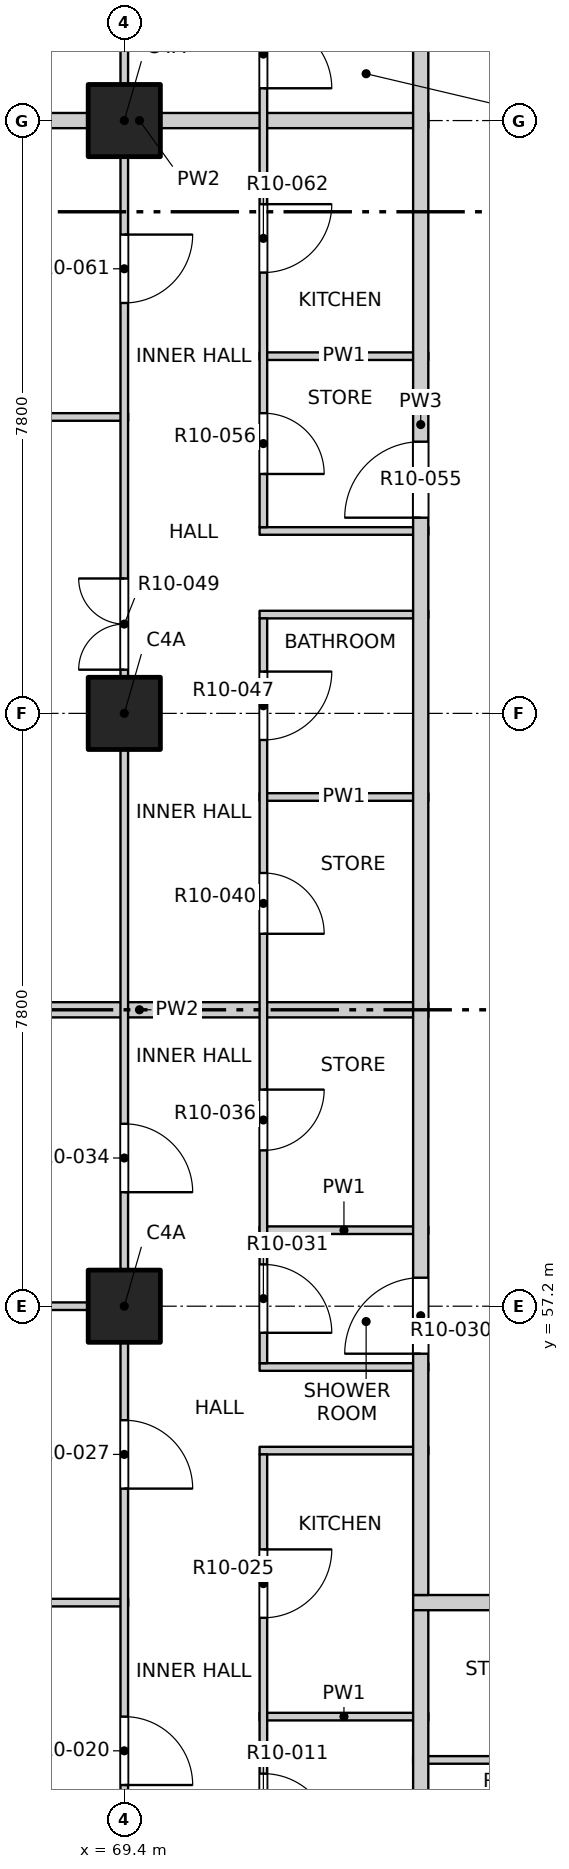
"""IFC4 building model, lengths in metres.
Left out: names, types, materials, properties, quantities, classifications, styles, units other than length and angle.
Written with IfcOpenShell. Run it as: python <this file> out.ifc"""

import sys

from ifc_helpers import new_model, si_unit, direction, frame, frame_2d, origin, origin_2d, place, context, subcontext, project, spatial, rectangle, extrude, element, fill, save


model = new_model("IFC4")
c1 = context("Model", 3, precision=1e-05, world=origin(), true_north=direction((0.0, 1.0)))
c2 = subcontext(c1, "Body", "Model", "MODEL_VIEW")
j1 = project(units=[si_unit("LENGTHUNIT", "METRE"), si_unit("PLANEANGLEUNIT", "RADIAN")], contexts=[c1])
p1 = place(None, origin())
s1 = spatial("IfcSite", under=j1, at=p1, CompositionType="ELEMENT")
p2 = place(p1, origin())
s2 = spatial("IfcBuilding", under=s1, at=p2, CompositionType="ELEMENT")
p3 = place(p2, frame((0.0, 0.0, 123.7)))
s3 = spatial("IfcBuildingStorey", under=s2, at=p3, CompositionType="ELEMENT", Elevation=123.7)
for number, where, z_axis, x_axis in (
    (1, (69.4, 57.2, -0.3), (0.0, 0.0, 1.0), (1.0, 0.0, 0.0)),
    (2, (69.4, 65.0, -0.3), (0.0, 0.0, 1.0), (1.0, 0.0, 0.0)),
    (3, (69.4, 72.8, -0.3), (0.0, 0.0, 1.0), (1.0, 0.0, 0.0)),
):
    element("IfcColumn", number, at=place(p3, frame(where, z_axis=z_axis, x_axis=x_axis)), inside=s3, PredefinedType="COLUMN", context=c2, shape_type="SweptSolid", body=[
        extrude(rectangle(XDim=0.95, YDim=0.95, at=origin_2d()), origin(), (0.0, 0.0, 1.0), 3.45),
    ])
p4 = place(p3, frame((73.2, 51.23, 0.0), z_axis=(0.0, 0.0, 1.0), x_axis=(1.0, 0.0, 0.0)))
e4 = element("IfcWall", 4, at=p4, inside=s3, PredefinedType="PARTITIONING", context=c2, shape_type="SweptSolid", body=[
    extrude(rectangle(XDim=4.95, YDim=0.1, at=frame_2d((2.475, 0.0))), origin(), (0.0, 0.0, 1.0), 3.15),
])
p5 = place(p4, frame((1.2, 0.0, 0.0)))
e5 = element("IfcOpeningElement", 5, at=p5, cuts=e4, PredefinedType="OPENING", context=c2, shape_type="SweptSolid", body=[
    extrude(rectangle(XDim=0.8, YDim=2.1, at=frame_2d((0.4, 1.05))), frame((0.0, 0.06, 0.0), z_axis=(0.0, -1.0, 0.0), x_axis=(1.0, 0.0, 0.0)), (0.0, 0.0, 1.0), 0.12),
])
p6 = place(p4, frame((3.55, 0.0, 0.0)))
e6 = element("IfcOpeningElement", 6, at=p6, cuts=e4, PredefinedType="OPENING", context=c2, shape_type="SweptSolid", body=[
    extrude(rectangle(XDim=0.9, YDim=2.1, at=frame_2d((0.45, 1.05))), frame((0.0, 0.06, 0.0), z_axis=(0.0, -1.0, 0.0), x_axis=(1.0, 0.0, 0.0)), (0.0, 0.0, 1.0), 0.12),
])
p7 = place(p3, frame((71.18, 51.8, 0.0), z_axis=(0.0, 0.0, 1.0), x_axis=(1.0, 0.0, 0.0)))
e7 = element("IfcWall", 7, at=p7, inside=s3, PredefinedType="PARTITIONING", context=c2, shape_type="SweptSolid", body=[
    extrude(rectangle(XDim=2.22, YDim=0.1, at=frame_2d((1.11, 0.0))), origin(), (0.0, 0.0, 1.0), 3.15),
])
p8 = place(p3, frame((65.8, 53.3, 0.0), z_axis=(0.0, 0.0, 1.0), x_axis=(1.0, 0.0, 0.0)))
e8 = element("IfcWall", 8, at=p8, inside=s3, PredefinedType="PARTITIONING", context=c2, shape_type="SweptSolid", body=[
    extrude(rectangle(XDim=3.65, YDim=0.1, at=frame_2d((1.825, 0.0))), origin(), (0.0, 0.0, 1.0), 3.15),
])
p9 = place(p3, frame((73.2, 53.3, 0.0), z_axis=(0.0, 0.0, 1.0), x_axis=(1.0, 0.0, 0.0)))
e9 = element("IfcWall", 9, at=p9, inside=s3, PredefinedType="PARTITIONING", context=c2, shape_type="SweptSolid", body=[
    extrude(rectangle(XDim=23.6, YDim=0.2, at=frame_2d((11.8, 0.0))), origin(), (0.0, 0.0, 1.0), 3.15),
])
p10 = place(p9, frame((6.175, 0.0, 0.0)))
e10 = element("IfcOpeningElement", 10, at=p10, cuts=e9, PredefinedType="OPENING", context=c2, shape_type="SweptSolid", body=[
    extrude(rectangle(XDim=1.0, YDim=2.1, at=frame_2d((0.5, 1.05))), frame((0.0, 0.11, 0.0), z_axis=(0.0, -1.0, 0.0), x_axis=(1.0, 0.0, 0.0)), (0.0, 0.0, 1.0), 0.22),
])
p11 = place(p9, frame((18.775, 0.0, 0.0)))
e11 = element("IfcOpeningElement", 11, at=p11, cuts=e9, PredefinedType="OPENING", context=c2, shape_type="SweptSolid", body=[
    extrude(rectangle(XDim=1.0, YDim=2.1, at=frame_2d((0.5, 1.05))), frame((0.0, 0.11, 0.0), z_axis=(0.0, -1.0, 0.0), x_axis=(1.0, 0.0, 0.0)), (0.0, 0.0, 1.0), 0.22),
])
for number, where, z_axis, x_axis in (
    (12, (71.18, 55.3, 0.0), (0.0, 0.0, 1.0), (1.0, 0.0, 0.0)),
    (13, (71.18, 56.4, 0.0), (0.0, 0.0, 1.0), (1.0, 0.0, 0.0)),
):
    element("IfcWall", number, at=place(p3, frame(where, z_axis=z_axis, x_axis=x_axis)), inside=s3, PredefinedType="PARTITIONING", context=c2, shape_type="SweptSolid", body=[
        extrude(rectangle(XDim=2.22, YDim=0.1, at=frame_2d((1.11, 0.0))), origin(), (0.0, 0.0, 1.0), 3.15),
    ])
p12 = place(p3, frame((65.8, 57.2, 0.0), z_axis=(0.0, 0.0, 1.0), x_axis=(1.0, 0.0, 0.0)))
e14 = element("IfcWall", 14, at=p12, inside=s3, PredefinedType="PARTITIONING", context=c2, shape_type="SweptSolid", body=[
    extrude(rectangle(XDim=3.65, YDim=0.1, at=frame_2d((1.825, 0.0))), origin(), (0.0, 0.0, 1.0), 3.15),
])
p13 = place(p3, frame((71.18, 58.2, 0.0), z_axis=(0.0, 0.0, 1.0), x_axis=(1.0, 0.0, 0.0)))
e15 = element("IfcWall", 15, at=p13, inside=s3, PredefinedType="PARTITIONING", context=c2, shape_type="SweptSolid", body=[
    extrude(rectangle(XDim=2.22, YDim=0.1, at=frame_2d((1.11, 0.0))), origin(), (0.0, 0.0, 1.0), 3.15),
])
p14 = place(p3, frame((65.8, 61.1, 0.0), z_axis=(0.0, 0.0, 1.0), x_axis=(1.0, 0.0, 0.0)))
e16 = element("IfcWall", 16, at=p14, inside=s3, PredefinedType="PARTITIONING", context=c2, shape_type="SweptSolid", body=[
    extrude(rectangle(XDim=7.6, YDim=0.2, at=frame_2d((3.8, 0.0))), origin(), (0.0, 0.0, 1.0), 2.55),
])
for number, where, z_axis, x_axis in (
    (17, (71.18, 63.9, 0.0), (0.0, 0.0, 1.0), (1.0, 0.0, 0.0)),
    (18, (71.18, 66.3, 0.0), (0.0, 0.0, 1.0), (1.0, 0.0, 0.0)),
    (19, (71.18, 67.4, 0.0), (0.0, 0.0, 1.0), (1.0, 0.0, 0.0)),
):
    element("IfcWall", number, at=place(p3, frame(where, z_axis=z_axis, x_axis=x_axis)), inside=s3, PredefinedType="PARTITIONING", context=c2, shape_type="SweptSolid", body=[
        extrude(rectangle(XDim=2.22, YDim=0.1, at=frame_2d((1.11, 0.0))), origin(), (0.0, 0.0, 1.0), 3.15),
    ])
p15 = place(p3, frame((65.8, 68.9, 0.0), z_axis=(0.0, 0.0, 1.0), x_axis=(1.0, 0.0, 0.0)))
e20 = element("IfcWall", 20, at=p15, inside=s3, PredefinedType="PARTITIONING", context=c2, shape_type="SweptSolid", body=[
    extrude(rectangle(XDim=3.65, YDim=0.1, at=frame_2d((1.825, 0.0))), origin(), (0.0, 0.0, 1.0), 2.55),
])
p16 = place(p3, frame((71.18, 69.7, 0.0), z_axis=(0.0, 0.0, 1.0), x_axis=(1.0, 0.0, 0.0)))
e21 = element("IfcWall", 21, at=p16, inside=s3, PredefinedType="PARTITIONING", context=c2, shape_type="SweptSolid", body=[
    extrude(rectangle(XDim=2.22, YDim=0.1, at=frame_2d((1.11, 0.0))), origin(), (0.0, 0.0, 1.0), 3.15),
])
p17 = place(p3, frame((65.8, 72.8, 0.0), z_axis=(0.0, 0.0, 1.0), x_axis=(1.0, 0.0, 0.0)))
e22 = element("IfcWall", 22, at=p17, inside=s3, PredefinedType="PARTITIONING", context=c2, shape_type="SweptSolid", body=[
    extrude(rectangle(XDim=7.6, YDim=0.2, at=frame_2d((3.8, 0.0))), origin(), (0.0, 0.0, 1.0), 3.15),
])
p18 = place(p3, frame((69.4, 45.8, 0.0), z_axis=(0.0, 0.0, 1.0), x_axis=(0.0, 1.0, 0.0)))
e23 = element("IfcWall", 23, at=p18, inside=s3, PredefinedType="PARTITIONING", context=c2, shape_type="SweptSolid", body=[
    extrude(rectangle(XDim=38.4, YDim=0.1, at=frame_2d((19.2, 0.0))), origin(), (0.0, 0.0, 1.0), 3.15),
])
p19 = place(p18, frame((1.05, 0.0, 0.0)))
e24 = element("IfcOpeningElement", 24, at=p19, cuts=e23, PredefinedType="OPENING", context=c2, shape_type="SweptSolid", body=[
    extrude(rectangle(XDim=1.2, YDim=2.1, at=frame_2d((0.6, 1.05))), frame((0.0, 0.06, 0.0), z_axis=(0.0, -1.0, 0.0), x_axis=(1.0, 0.0, 0.0)), (0.0, 0.0, 1.0), 0.12),
])
p20 = place(p18, frame((5.1, 0.0, 0.0)))
e25 = element("IfcOpeningElement", 25, at=p20, cuts=e23, PredefinedType="OPENING", context=c2, shape_type="SweptSolid", body=[
    extrude(rectangle(XDim=0.9, YDim=2.1, at=frame_2d((0.45, 1.05))), frame((0.0, 0.06, 0.0), z_axis=(0.0, -1.0, 0.0), x_axis=(1.0, 0.0, 0.0)), (0.0, 0.0, 1.0), 0.12),
])
p21 = place(p18, frame((9.0, 0.0, 0.0)))
e26 = element("IfcOpeningElement", 26, at=p21, cuts=e23, PredefinedType="OPENING", context=c2, shape_type="SweptSolid", body=[
    extrude(rectangle(XDim=0.9, YDim=2.1, at=frame_2d((0.45, 1.05))), frame((0.0, 0.06, 0.0), z_axis=(0.0, -1.0, 0.0), x_axis=(1.0, 0.0, 0.0)), (0.0, 0.0, 1.0), 0.12),
])
p22 = place(p18, frame((12.9, 0.0, 0.0)))
e27 = element("IfcOpeningElement", 27, at=p22, cuts=e23, PredefinedType="OPENING", context=c2, shape_type="SweptSolid", body=[
    extrude(rectangle(XDim=0.9, YDim=2.1, at=frame_2d((0.45, 1.05))), frame((0.0, 0.06, 0.0), z_axis=(0.0, -1.0, 0.0), x_axis=(1.0, 0.0, 0.0)), (0.0, 0.0, 1.0), 0.12),
])
p23 = place(p18, frame((19.775, 0.0, 0.0)))
e28 = element("IfcOpeningElement", 28, at=p23, cuts=e23, PredefinedType="OPENING", context=c2, shape_type="SweptSolid", body=[
    extrude(rectangle(XDim=1.2, YDim=2.1, at=frame_2d((0.6, 1.05))), frame((0.0, 0.06, 0.0), z_axis=(0.0, -1.0, 0.0), x_axis=(1.0, 0.0, 0.0)), (0.0, 0.0, 1.0), 0.12),
])
p24 = place(p18, frame((24.6, 0.0, 0.0)))
e29 = element("IfcOpeningElement", 29, at=p24, cuts=e23, PredefinedType="OPENING", context=c2, shape_type="SweptSolid", body=[
    extrude(rectangle(XDim=0.9, YDim=2.1, at=frame_2d((0.45, 1.05))), frame((0.0, 0.06, 0.0), z_axis=(0.0, -1.0, 0.0), x_axis=(1.0, 0.0, 0.0)), (0.0, 0.0, 1.0), 0.12),
])
p25 = place(p18, frame((30.3, 0.0, 0.0)))
e30 = element("IfcOpeningElement", 30, at=p25, cuts=e23, PredefinedType="OPENING", context=c2, shape_type="SweptSolid", body=[
    extrude(rectangle(XDim=1.2, YDim=2.1, at=frame_2d((0.6, 1.05))), frame((0.0, 0.06, 0.0), z_axis=(0.0, -1.0, 0.0), x_axis=(1.0, 0.0, 0.0)), (0.0, 0.0, 1.0), 0.12),
])
p26 = place(p18, frame((36.15, 0.0, 0.0)))
e31 = element("IfcOpeningElement", 31, at=p26, cuts=e23, PredefinedType="OPENING", context=c2, shape_type="SweptSolid", body=[
    extrude(rectangle(XDim=1.2, YDim=2.1, at=frame_2d((0.6, 1.05))), frame((0.0, 0.06, 0.0), z_axis=(0.0, -1.0, 0.0), x_axis=(1.0, 0.0, 0.0)), (0.0, 0.0, 1.0), 0.12),
])
p27 = place(p3, frame((71.23, 49.45, 0.0), z_axis=(0.0, 0.0, 1.0), x_axis=(0.0, 1.0, 0.0)))
e32 = element("IfcWall", 32, at=p27, inside=s3, PredefinedType="PARTITIONING", context=c2, shape_type="SweptSolid", body=[
    extrude(rectangle(XDim=5.8, YDim=0.1, at=frame_2d((2.9, 0.0))), origin(), (0.0, 0.0, 1.0), 3.15),
])
p28 = place(p27, frame((0.7, 0.0, 0.0)))
e33 = element("IfcOpeningElement", 33, at=p28, cuts=e32, PredefinedType="OPENING", context=c2, shape_type="SweptSolid", body=[
    extrude(rectangle(XDim=0.9, YDim=2.1, at=frame_2d((0.45, 1.05))), frame((0.0, 0.06, 0.0), z_axis=(0.0, -1.0, 0.0), x_axis=(1.0, 0.0, 0.0)), (0.0, 0.0, 1.0), 0.12),
])
p29 = place(p27, frame((3.65, 0.0, 0.0)))
e34 = element("IfcOpeningElement", 34, at=p29, cuts=e32, PredefinedType="OPENING", context=c2, shape_type="SweptSolid", body=[
    extrude(rectangle(XDim=0.9, YDim=2.1, at=frame_2d((0.45, 1.05))), frame((0.0, 0.06, 0.0), z_axis=(0.0, -1.0, 0.0), x_axis=(1.0, 0.0, 0.0)), (0.0, 0.0, 1.0), 0.12),
])
p30 = place(p3, frame((71.23, 56.45, 0.0), z_axis=(0.0, 0.0, 1.0), x_axis=(0.0, 1.0, 0.0)))
e35 = element("IfcWall", 35, at=p30, inside=s3, PredefinedType="PARTITIONING", context=c2, shape_type="SweptSolid", body=[
    extrude(rectangle(XDim=9.8, YDim=0.1, at=frame_2d((4.9, 0.0))), origin(), (0.0, 0.0, 1.0), 3.15),
])
p31 = place(p30, frame((0.4, 0.0, 0.0)))
e36 = element("IfcOpeningElement", 36, at=p31, cuts=e35, PredefinedType="OPENING", context=c2, shape_type="SweptSolid", body=[
    extrude(rectangle(XDim=0.9, YDim=2.1, at=frame_2d((0.45, 1.05))), frame((0.0, 0.06, 0.0), z_axis=(0.0, -1.0, 0.0), x_axis=(1.0, 0.0, 0.0)), (0.0, 0.0, 1.0), 0.12),
])
p32 = place(p30, frame((2.8, 0.0, 0.0)))
e37 = element("IfcOpeningElement", 37, at=p32, cuts=e35, PredefinedType="OPENING", context=c2, shape_type="SweptSolid", body=[
    extrude(rectangle(XDim=0.8, YDim=2.1, at=frame_2d((0.4, 1.05))), frame((0.0, 0.06, 0.0), z_axis=(0.0, -1.0, 0.0), x_axis=(1.0, 0.0, 0.0)), (0.0, 0.0, 1.0), 0.12),
])
p33 = place(p30, frame((5.65, 0.0, 0.0)))
e38 = element("IfcOpeningElement", 38, at=p33, cuts=e35, PredefinedType="OPENING", context=c2, shape_type="SweptSolid", body=[
    extrude(rectangle(XDim=0.8, YDim=2.1, at=frame_2d((0.4, 1.05))), frame((0.0, 0.06, 0.0), z_axis=(0.0, -1.0, 0.0), x_axis=(1.0, 0.0, 0.0)), (0.0, 0.0, 1.0), 0.12),
])
p34 = place(p30, frame((8.2, 0.0, 0.0)))
e39 = element("IfcOpeningElement", 39, at=p34, cuts=e35, PredefinedType="OPENING", context=c2, shape_type="SweptSolid", body=[
    extrude(rectangle(XDim=0.9, YDim=2.1, at=frame_2d((0.45, 1.05))), frame((0.0, 0.06, 0.0), z_axis=(0.0, -1.0, 0.0), x_axis=(1.0, 0.0, 0.0)), (0.0, 0.0, 1.0), 0.12),
])
p35 = place(p3, frame((71.23, 67.45, 0.0), z_axis=(0.0, 0.0, 1.0), x_axis=(0.0, 1.0, 0.0)))
e40 = element("IfcWall", 40, at=p35, inside=s3, PredefinedType="PARTITIONING", context=c2, shape_type="SweptSolid", body=[
    extrude(rectangle(XDim=7.05, YDim=0.1, at=frame_2d((3.525, 0.0))), origin(), (0.0, 0.0, 1.0), 3.15),
])
p36 = place(p35, frame((0.7, 0.0, 0.0)))
e41 = element("IfcOpeningElement", 41, at=p36, cuts=e40, PredefinedType="OPENING", context=c2, shape_type="SweptSolid", body=[
    extrude(rectangle(XDim=0.8, YDim=2.1, at=frame_2d((0.4, 1.05))), frame((0.0, 0.06, 0.0), z_axis=(0.0, -1.0, 0.0), x_axis=(1.0, 0.0, 0.0)), (0.0, 0.0, 1.0), 0.12),
])
p37 = place(p35, frame((3.35, 0.0, 0.0)))
e42 = element("IfcOpeningElement", 42, at=p37, cuts=e40, PredefinedType="OPENING", context=c2, shape_type="SweptSolid", body=[
    extrude(rectangle(XDim=0.9, YDim=2.1, at=frame_2d((0.45, 1.05))), frame((0.0, 0.06, 0.0), z_axis=(0.0, -1.0, 0.0), x_axis=(1.0, 0.0, 0.0)), (0.0, 0.0, 1.0), 0.12),
])
p38 = place(p35, frame((5.775, 0.0, 0.0)))
e43 = element("IfcOpeningElement", 43, at=p38, cuts=e40, PredefinedType="OPENING", context=c2, shape_type="SweptSolid", body=[
    extrude(rectangle(XDim=0.9, YDim=2.1, at=frame_2d((0.45, 1.05))), frame((0.0, 0.06, 0.0), z_axis=(0.0, -1.0, 0.0), x_axis=(1.0, 0.0, 0.0)), (0.0, 0.0, 1.0), 0.12),
])
p39 = place(p3, frame((73.3, 45.8, 0.0), z_axis=(0.0, 0.0, 1.0), x_axis=(0.0, 1.0, 0.0)))
e44 = element("IfcWall", 44, at=p39, inside=s3, PredefinedType="PARTITIONING", context=c2, shape_type="SweptSolid", body=[
    extrude(rectangle(XDim=7.4, YDim=0.2, at=frame_2d((3.7, 0.0))), origin(), (0.0, 0.0, 1.0), 3.15),
])
p40 = place(p3, frame((73.3, 53.4, 0.0), z_axis=(0.0, 0.0, 1.0), x_axis=(0.0, 1.0, 0.0)))
e45 = element("IfcWall", 45, at=p40, inside=s3, PredefinedType="PARTITIONING", context=c2, shape_type="SweptSolid", body=[
    extrude(rectangle(XDim=30.8, YDim=0.2, at=frame_2d((15.4, 0.0))), origin(), (0.0, 0.0, 1.0), 3.15),
])
p41 = place(p40, frame((3.175, 0.0, 0.0)))
e46 = element("IfcOpeningElement", 46, at=p41, cuts=e45, PredefinedType="OPENING", context=c2, shape_type="SweptSolid", body=[
    extrude(rectangle(XDim=1.0, YDim=2.1, at=frame_2d((0.5, 1.05))), frame((0.0, 0.11, 0.0), z_axis=(0.0, -1.0, 0.0), x_axis=(1.0, 0.0, 0.0)), (0.0, 0.0, 1.0), 0.22),
])
p42 = place(p40, frame((14.175, 0.0, 0.0)))
e47 = element("IfcOpeningElement", 47, at=p42, cuts=e45, PredefinedType="OPENING", context=c2, shape_type="SweptSolid", body=[
    extrude(rectangle(XDim=1.0, YDim=2.1, at=frame_2d((0.5, 1.05))), frame((0.0, 0.11, 0.0), z_axis=(0.0, -1.0, 0.0), x_axis=(1.0, 0.0, 0.0)), (0.0, 0.0, 1.0), 0.22),
])
p43 = place(p40, frame((22.425, 0.0, 0.0)))
e48 = element("IfcOpeningElement", 48, at=p43, cuts=e45, PredefinedType="OPENING", context=c2, shape_type="SweptSolid", body=[
    extrude(rectangle(XDim=1.0, YDim=2.1, at=frame_2d((0.5, 1.05))), frame((0.0, 0.11, 0.0), z_axis=(0.0, -1.0, 0.0), x_axis=(1.0, 0.0, 0.0)), (0.0, 0.0, 1.0), 0.22),
])
p44 = place(p28, origin())
e49 = element("IfcDoor", 49, at=p44, inside=s3, OperationType="SINGLE_SWING_RIGHT", PredefinedType="DOOR", context=c2, shape_type="SweptSolid", body=[
    extrude(rectangle(XDim=0.9, YDim=2.1, at=frame_2d((0.45, 1.05))), frame((0.0, 0.025, 0.0), z_axis=(0.0, -1.0, 0.0), x_axis=(1.0, 0.0, 0.0)), (0.0, 0.0, 1.0), 0.05),
])
fill(e33, e49)
p45 = place(p20, origin())
e50 = element("IfcDoor", 50, at=p45, inside=s3, OperationType="SINGLE_SWING_RIGHT", PredefinedType="DOOR", context=c2, shape_type="SweptSolid", body=[
    extrude(rectangle(XDim=0.9, YDim=2.1, at=frame_2d((0.45, 1.05))), frame((0.0, 0.025, 0.0), z_axis=(0.0, -1.0, 0.0), x_axis=(1.0, 0.0, 0.0)), (0.0, 0.0, 1.0), 0.05),
])
fill(e25, e50)
p46 = place(p29, origin())
e51 = element("IfcDoor", 51, at=p46, inside=s3, OperationType="SINGLE_SWING_LEFT", PredefinedType="DOOR", context=c2, shape_type="SweptSolid", body=[
    extrude(rectangle(XDim=0.9, YDim=2.1, at=frame_2d((0.45, 1.05))), frame((0.0, 0.025, 0.0), z_axis=(0.0, -1.0, 0.0), x_axis=(1.0, 0.0, 0.0)), (0.0, 0.0, 1.0), 0.05),
])
fill(e34, e51)
p47 = place(p21, origin())
e52 = element("IfcDoor", 52, at=p47, inside=s3, OperationType="SINGLE_SWING_RIGHT", PredefinedType="DOOR", context=c2, shape_type="SweptSolid", body=[
    extrude(rectangle(XDim=0.9, YDim=2.1, at=frame_2d((0.45, 1.05))), frame((0.0, 0.025, 0.0), z_axis=(0.0, -1.0, 0.0), x_axis=(1.0, 0.0, 0.0)), (0.0, 0.0, 1.0), 0.05),
])
fill(e26, e52)
p48 = place(p41, origin())
e53 = element("IfcDoor", 53, at=p48, inside=s3, OperationType="SINGLE_SWING_RIGHT", PredefinedType="DOOR", context=c2, shape_type="SweptSolid", body=[
    extrude(rectangle(XDim=1.0, YDim=2.1, at=frame_2d((0.5, 1.05))), frame((0.0, 0.025, 0.0), z_axis=(0.0, -1.0, 0.0), x_axis=(1.0, 0.0, 0.0)), (0.0, 0.0, 1.0), 0.05),
])
fill(e46, e53)
p49 = place(p31, origin())
e54 = element("IfcDoor", 54, at=p49, inside=s3, OperationType="SINGLE_SWING_RIGHT", PredefinedType="DOOR", context=c2, shape_type="SweptSolid", body=[
    extrude(rectangle(XDim=0.9, YDim=2.1, at=frame_2d((0.45, 1.05))), frame((0.0, 0.025, 0.0), z_axis=(0.0, -1.0, 0.0), x_axis=(1.0, 0.0, 0.0)), (0.0, 0.0, 1.0), 0.05),
])
fill(e36, e54)
p50 = place(p22, origin())
e55 = element("IfcDoor", 55, at=p50, inside=s3, OperationType="SINGLE_SWING_RIGHT", PredefinedType="DOOR", context=c2, shape_type="SweptSolid", body=[
    extrude(rectangle(XDim=0.9, YDim=2.1, at=frame_2d((0.45, 1.05))), frame((0.0, 0.025, 0.0), z_axis=(0.0, -1.0, 0.0), x_axis=(1.0, 0.0, 0.0)), (0.0, 0.0, 1.0), 0.05),
])
fill(e27, e55)
p51 = place(p32, origin())
e56 = element("IfcDoor", 56, at=p51, inside=s3, OperationType="SINGLE_SWING_LEFT", PredefinedType="DOOR", context=c2, shape_type="SweptSolid", body=[
    extrude(rectangle(XDim=0.8, YDim=2.1, at=frame_2d((0.4, 1.05))), frame((0.0, 0.025, 0.0), z_axis=(0.0, -1.0, 0.0), x_axis=(1.0, 0.0, 0.0)), (0.0, 0.0, 1.0), 0.05),
])
fill(e37, e56)
p52 = place(p33, origin())
e57 = element("IfcDoor", 57, at=p52, inside=s3, OperationType="SINGLE_SWING_RIGHT", PredefinedType="DOOR", context=c2, shape_type="SweptSolid", body=[
    extrude(rectangle(XDim=0.8, YDim=2.1, at=frame_2d((0.4, 1.05))), frame((0.0, 0.025, 0.0), z_axis=(0.0, -1.0, 0.0), x_axis=(1.0, 0.0, 0.0)), (0.0, 0.0, 1.0), 0.05),
])
fill(e38, e57)
p53 = place(p34, origin())
e58 = element("IfcDoor", 58, at=p53, inside=s3, OperationType="SINGLE_SWING_LEFT", PredefinedType="DOOR", context=c2, shape_type="SweptSolid", body=[
    extrude(rectangle(XDim=0.9, YDim=2.1, at=frame_2d((0.45, 1.05))), frame((0.0, 0.025, 0.0), z_axis=(0.0, -1.0, 0.0), x_axis=(1.0, 0.0, 0.0)), (0.0, 0.0, 1.0), 0.05),
])
fill(e39, e58)
p54 = place(p23, origin())
e59 = element("IfcDoor", 59, at=p54, inside=s3, OperationType="DOUBLE_DOOR_SINGLE_SWING", PredefinedType="DOOR", context=c2, shape_type="SweptSolid", body=[
    extrude(rectangle(XDim=1.2, YDim=2.1, at=frame_2d((0.6, 1.05))), frame((0.0, 0.025, 0.0), z_axis=(0.0, -1.0, 0.0), x_axis=(1.0, 0.0, 0.0)), (0.0, 0.0, 1.0), 0.05),
])
fill(e28, e59)
p55 = place(p42, origin())
e60 = element("IfcDoor", 60, at=p55, inside=s3, OperationType="SINGLE_SWING_RIGHT", PredefinedType="DOOR", context=c2, shape_type="SweptSolid", body=[
    extrude(rectangle(XDim=1.0, YDim=2.1, at=frame_2d((0.5, 1.05))), frame((0.0, 0.025, 0.0), z_axis=(0.0, -1.0, 0.0), x_axis=(1.0, 0.0, 0.0)), (0.0, 0.0, 1.0), 0.05),
])
fill(e47, e60)
p56 = place(p36, origin())
e61 = element("IfcDoor", 61, at=p56, inside=s3, OperationType="SINGLE_SWING_RIGHT", PredefinedType="DOOR", context=c2, shape_type="SweptSolid", body=[
    extrude(rectangle(XDim=0.8, YDim=2.1, at=frame_2d((0.4, 1.05))), frame((0.0, 0.025, 0.0), z_axis=(0.0, -1.0, 0.0), x_axis=(1.0, 0.0, 0.0)), (0.0, 0.0, 1.0), 0.05),
])
fill(e41, e61)
p57 = place(p24, origin())
e62 = element("IfcDoor", 62, at=p57, inside=s3, OperationType="SINGLE_SWING_LEFT", PredefinedType="DOOR", context=c2, shape_type="SweptSolid", body=[
    extrude(rectangle(XDim=0.9, YDim=2.1, at=frame_2d((0.45, 1.05))), frame((0.0, 0.025, 0.0), z_axis=(0.0, -1.0, 0.0), x_axis=(1.0, 0.0, 0.0)), (0.0, 0.0, 1.0), 0.05),
])
fill(e29, e62)
p58 = place(p37, origin())
e63 = element("IfcDoor", 63, at=p58, inside=s3, OperationType="SINGLE_SWING_LEFT", PredefinedType="DOOR", context=c2, shape_type="SweptSolid", body=[
    extrude(rectangle(XDim=0.9, YDim=2.1, at=frame_2d((0.45, 1.05))), frame((0.0, 0.025, 0.0), z_axis=(0.0, -1.0, 0.0), x_axis=(1.0, 0.0, 0.0)), (0.0, 0.0, 1.0), 0.05),
])
fill(e42, e63)
p59 = place(p38, origin())
e64 = element("IfcDoor", 64, at=p59, inside=s3, OperationType="SINGLE_SWING_RIGHT", PredefinedType="DOOR", context=c2, shape_type="SweptSolid", body=[
    extrude(rectangle(XDim=0.9, YDim=2.1, at=frame_2d((0.45, 1.05))), frame((0.0, 0.025, 0.0), z_axis=(0.0, -1.0, 0.0), x_axis=(1.0, 0.0, 0.0)), (0.0, 0.0, 1.0), 0.05),
])
fill(e43, e64)
save(model, sys.argv[1])
